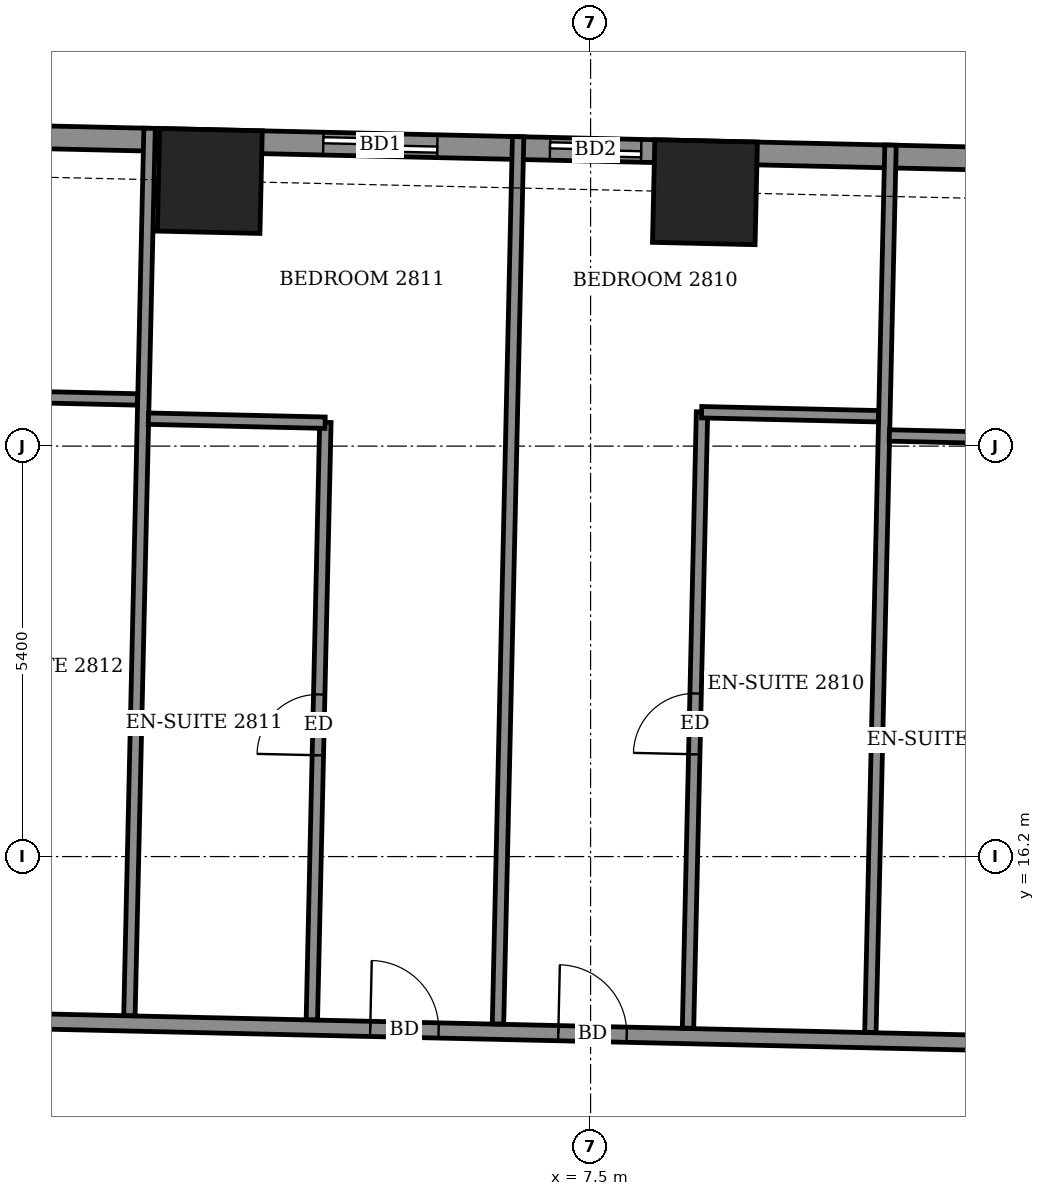
"""IFC4 building model, lengths in metres.
Left out: names, types, materials, properties, quantities, classifications, styles, units other than length and angle.
Written with IfcOpenShell. Run it as: python <this file> out.ifc"""

import sys

from ifc_helpers import new_model, si_unit, direction, frame, frame_2d, origin, origin_2d, place, context, subcontext, project, spatial, rectangle, extrude, element, fill, save


model = new_model("IFC4")
c1 = context("Model", 3, precision=1e-05, world=origin(), true_north=direction((0.0, 1.0)))
c2 = subcontext(c1, "Body", "Model", "MODEL_VIEW")
j1 = project(units=[si_unit("LENGTHUNIT", "METRE"), si_unit("PLANEANGLEUNIT", "RADIAN")], contexts=[c1])
p1 = place(None, origin())
s1 = spatial("IfcSite", under=j1, at=p1, CompositionType="ELEMENT")
p2 = place(p1, origin())
s2 = spatial("IfcBuilding", under=s1, at=p2, CompositionType="ELEMENT")
p3 = place(p2, frame((0.0, 0.0, 112.7)))
s3 = spatial("IfcBuildingStorey", under=s2, at=p3, CompositionType="ELEMENT", Elevation=112.7)
for number, where, z_axis, x_axis in (
    (1, (9.005, 24.94, -0.55), (0.0, 0.0, 1.0), (-1.0, 0.023, 0.0)),
    (2, (2.491, 25.088, -0.55), (0.0, 0.0, 1.0), (-1.0, 0.023, 0.0)),
):
    element("IfcColumn", number, at=place(p3, frame(where, z_axis=z_axis, x_axis=x_axis)), inside=s3, PredefinedType="COLUMN", context=c2, shape_type="SweptSolid", body=[
        extrude(rectangle(XDim=1.35, YDim=1.35, at=origin_2d()), origin(), (0.0, 0.0, 1.0), 3.6),
    ])
p4 = place(p3, frame((21.894, 25.173, 0.0), z_axis=(0.0, 0.0, 1.0), x_axis=(-0.999742661083, 0.022685052594, 0.0)))
e3 = element("IfcWall", 3, at=p4, inside=s3, PredefinedType="SOLIDWALL", context=c2, shape_type="SweptSolid", body=[
    extrude(rectangle(XDim=45.309, YDim=0.3, at=frame_2d((22.654, 0.0))), origin(), (0.0, 0.0, 1.0), 3.05),
])
p5 = place(p4, frame((2.495, 0.0, 0.0)))
e4 = element("IfcOpeningElement", 4, at=p5, cuts=e3, PredefinedType="OPENING", context=c2, shape_type="SweptSolid", body=[
    extrude(rectangle(XDim=1.5, YDim=2.4, at=frame_2d((0.75, 1.2))), frame((0.0, 0.16, 0.0), z_axis=(0.0, -1.0, 0.0), x_axis=(1.0, 0.0, 0.0)), (0.0, 0.0, 1.0), 0.32),
])
p6 = place(p4, frame((7.874, 0.0, 0.0)))
e5 = element("IfcOpeningElement", 5, at=p6, cuts=e3, PredefinedType="OPENING", context=c2, shape_type="SweptSolid", body=[
    extrude(rectangle(XDim=1.5, YDim=2.4, at=frame_2d((0.75, 1.2))), frame((0.0, 0.16, 0.0), z_axis=(0.0, -1.0, 0.0), x_axis=(1.0, 0.0, 0.0)), (0.0, 0.0, 1.0), 0.32),
])
p7 = place(p4, frame((13.732, 0.0, 0.0)))
e6 = element("IfcOpeningElement", 6, at=p7, cuts=e3, PredefinedType="OPENING", context=c2, shape_type="SweptSolid", body=[
    extrude(rectangle(XDim=1.2, YDim=2.4, at=frame_2d((0.6, 1.2))), frame((0.0, 0.16, 0.0), z_axis=(0.0, -1.0, 0.0), x_axis=(1.0, 0.0, 0.0)), (0.0, 0.0, 1.0), 0.32),
])
p8 = place(p4, frame((16.415, 0.0, 0.0)))
e7 = element("IfcOpeningElement", 7, at=p8, cuts=e3, PredefinedType="OPENING", context=c2, shape_type="SweptSolid", body=[
    extrude(rectangle(XDim=1.5, YDim=2.4, at=frame_2d((0.75, 1.2))), frame((0.0, 0.16, 0.0), z_axis=(0.0, -1.0, 0.0), x_axis=(1.0, 0.0, 0.0)), (0.0, 0.0, 1.0), 0.32),
])
p9 = place(p4, frame((21.908, 0.0, 0.0)))
e8 = element("IfcOpeningElement", 8, at=p9, cuts=e3, PredefinedType="OPENING", context=c2, shape_type="SweptSolid", body=[
    extrude(rectangle(XDim=1.5, YDim=2.4, at=frame_2d((0.75, 1.2))), frame((0.0, 0.16, 0.0), z_axis=(0.0, -1.0, 0.0), x_axis=(1.0, 0.0, 0.0)), (0.0, 0.0, 1.0), 0.32),
])
p10 = place(p4, frame((27.397, 0.0, 0.0)))
e9 = element("IfcOpeningElement", 9, at=p10, cuts=e3, PredefinedType="OPENING", context=c2, shape_type="SweptSolid", body=[
    extrude(rectangle(XDim=1.5, YDim=2.4, at=frame_2d((0.75, 1.2))), frame((0.0, 0.16, 0.0), z_axis=(0.0, -1.0, 0.0), x_axis=(1.0, 0.0, 0.0)), (0.0, 0.0, 1.0), 0.32),
])
p11 = place(p4, frame((30.38, 0.0, 0.0)))
e10 = element("IfcOpeningElement", 10, at=p11, cuts=e3, PredefinedType="OPENING", context=c2, shape_type="SweptSolid", body=[
    extrude(rectangle(XDim=1.2, YDim=2.4, at=frame_2d((0.6, 1.2))), frame((0.0, 0.16, 0.0), z_axis=(0.0, -1.0, 0.0), x_axis=(1.0, 0.0, 0.0)), (0.0, 0.0, 1.0), 0.32),
])
p12 = place(p4, frame((35.913, 0.0, 0.0)))
e11 = element("IfcOpeningElement", 11, at=p12, cuts=e3, PredefinedType="OPENING", context=c2, shape_type="SweptSolid", body=[
    extrude(rectangle(XDim=1.5, YDim=2.4, at=frame_2d((0.75, 1.2))), frame((0.0, 0.16, 0.0), z_axis=(0.0, -1.0, 0.0), x_axis=(1.0, 0.0, 0.0)), (0.0, 0.0, 1.0), 0.32),
])
p13 = place(p4, frame((40.818, 0.0, 0.9)))
e12 = element("IfcOpeningElement", 12, at=p13, cuts=e3, PredefinedType="OPENING", context=c2, shape_type="SweptSolid", body=[
    extrude(rectangle(XDim=2.4, YDim=1.5, at=frame_2d((1.2, 0.75))), frame((0.0, 0.16, 0.0), z_axis=(0.0, -1.0, 0.0), x_axis=(1.0, 0.0, 0.0)), (0.0, 0.0, 1.0), 0.32),
])
p14 = place(p3, frame((-26.341, 14.635, 0.0), z_axis=(0.0, 0.0, 1.0), x_axis=(0.999742553034, -0.02268981385, 0.0)))
e13 = element("IfcWall", 13, at=p14, inside=s3, PredefinedType="PARTITIONING", context=c2, shape_type="SweptSolid", body=[
    extrude(rectangle(XDim=50.733, YDim=0.2, at=frame_2d((25.366, 0.0))), origin(), (0.0, 0.0, 1.0), 3.05),
])
p15 = place(p14, frame((47.954, 0.0, 0.0)))
e14 = element("IfcOpeningElement", 14, at=p15, cuts=e13, PredefinedType="OPENING", context=c2, shape_type="SweptSolid", body=[
    extrude(rectangle(XDim=1.0, YDim=2.1, at=frame_2d((0.5, 1.05))), frame((0.0, 0.11, 0.0), z_axis=(0.0, -1.0, 0.0), x_axis=(1.0, 0.0, 0.0)), (0.0, 0.0, 1.0), 0.22),
])
p16 = place(p14, frame((43.125, 0.0, 0.0)))
e15 = element("IfcOpeningElement", 15, at=p16, cuts=e13, PredefinedType="OPENING", context=c2, shape_type="SweptSolid", body=[
    extrude(rectangle(XDim=0.9, YDim=2.1, at=frame_2d((0.45, 1.05))), frame((0.0, 0.11, 0.0), z_axis=(0.0, -1.0, 0.0), x_axis=(1.0, 0.0, 0.0)), (0.0, 0.0, 1.0), 0.22),
])
p17 = place(p14, frame((40.7, 0.0, 0.0)))
e16 = element("IfcOpeningElement", 16, at=p17, cuts=e13, PredefinedType="OPENING", context=c2, shape_type="SweptSolid", body=[
    extrude(rectangle(XDim=0.9, YDim=2.1, at=frame_2d((0.45, 1.05))), frame((0.0, 0.11, 0.0), z_axis=(0.0, -1.0, 0.0), x_axis=(1.0, 0.0, 0.0)), (0.0, 0.0, 1.0), 0.22),
])
p18 = place(p14, frame((33.425, 0.0, 0.0)))
e17 = element("IfcOpeningElement", 17, at=p18, cuts=e13, PredefinedType="OPENING", context=c2, shape_type="SweptSolid", body=[
    extrude(rectangle(XDim=0.9, YDim=2.1, at=frame_2d((0.45, 1.05))), frame((0.0, 0.11, 0.0), z_axis=(0.0, -1.0, 0.0), x_axis=(1.0, 0.0, 0.0)), (0.0, 0.0, 1.0), 0.22),
])
p19 = place(p14, frame((30.95, 0.0, 0.0)))
e18 = element("IfcOpeningElement", 18, at=p19, cuts=e13, PredefinedType="OPENING", context=c2, shape_type="SweptSolid", body=[
    extrude(rectangle(XDim=0.9, YDim=2.1, at=frame_2d((0.45, 1.05))), frame((0.0, 0.11, 0.0), z_axis=(0.0, -1.0, 0.0), x_axis=(1.0, 0.0, 0.0)), (0.0, 0.0, 1.0), 0.22),
])
p20 = place(p14, frame((23.675, 0.0, 0.0)))
e19 = element("IfcOpeningElement", 19, at=p20, cuts=e13, PredefinedType="OPENING", context=c2, shape_type="SweptSolid", body=[
    extrude(rectangle(XDim=0.9, YDim=2.1, at=frame_2d((0.45, 1.05))), frame((0.0, 0.11, 0.0), z_axis=(0.0, -1.0, 0.0), x_axis=(1.0, 0.0, 0.0)), (0.0, 0.0, 1.0), 0.22),
])
p21 = place(p14, frame((21.2, 0.0, 0.0)))
e20 = element("IfcOpeningElement", 20, at=p21, cuts=e13, PredefinedType="OPENING", context=c2, shape_type="SweptSolid", body=[
    extrude(rectangle(XDim=0.9, YDim=2.1, at=frame_2d((0.45, 1.05))), frame((0.0, 0.11, 0.0), z_axis=(0.0, -1.0, 0.0), x_axis=(1.0, 0.0, 0.0)), (0.0, 0.0, 1.0), 0.22),
])
p22 = place(p14, frame((13.95, 0.0, 0.0)))
e21 = element("IfcOpeningElement", 21, at=p22, cuts=e13, PredefinedType="OPENING", context=c2, shape_type="SweptSolid", body=[
    extrude(rectangle(XDim=0.9, YDim=2.1, at=frame_2d((0.45, 1.05))), frame((0.0, 0.11, 0.0), z_axis=(0.0, -1.0, 0.0), x_axis=(1.0, 0.0, 0.0)), (0.0, 0.0, 1.0), 0.22),
])
p23 = place(p14, frame((11.475, 0.0, 0.0)))
e22 = element("IfcOpeningElement", 22, at=p23, cuts=e13, PredefinedType="OPENING", context=c2, shape_type="SweptSolid", body=[
    extrude(rectangle(XDim=0.9, YDim=2.1, at=frame_2d((0.45, 1.05))), frame((0.0, 0.11, 0.0), z_axis=(0.0, -1.0, 0.0), x_axis=(1.0, 0.0, 0.0)), (0.0, 0.0, 1.0), 0.22),
])
p24 = place(p14, frame((1.4, 0.0, 0.0)))
e23 = element("IfcOpeningElement", 23, at=p24, cuts=e13, PredefinedType="OPENING", context=c2, shape_type="SweptSolid", body=[
    extrude(rectangle(XDim=1.0, YDim=2.1, at=frame_2d((0.5, 1.05))), frame((0.0, 0.11, 0.0), z_axis=(0.0, -1.0, 0.0), x_axis=(1.0, 0.0, 0.0)), (0.0, 0.0, 1.0), 0.22),
])
p25 = place(p14, frame((6.625, 0.0, 0.0)))
e24 = element("IfcOpeningElement", 24, at=p25, cuts=e13, PredefinedType="OPENING", context=c2, shape_type="SweptSolid", body=[
    extrude(rectangle(XDim=0.9, YDim=2.1, at=frame_2d((0.45, 1.05))), frame((0.0, 0.11, 0.0), z_axis=(0.0, -1.0, 0.0), x_axis=(1.0, 0.0, 0.0)), (0.0, 0.0, 1.0), 0.22),
])
p26 = place(p3, frame((1.433, 14.108, 0.0), z_axis=(0.0, 0.0, 1.0), x_axis=(0.022686732602, 0.99974262296, 0.0)))
e25 = element("IfcWall", 25, at=p26, inside=s3, PredefinedType="PARTITIONING", context=c2, shape_type="SweptSolid", body=[
    extrude(rectangle(XDim=11.676, YDim=0.15, at=frame_2d((5.838, 0.0))), origin(), (0.0, 0.0, 1.0), 2.55),
])
p27 = place(p3, frame((3.833, 14.054, 0.0), z_axis=(0.0, 0.0, 1.0), x_axis=(0.022643088621, 0.999743612402, 0.0)))
e26 = element("IfcWall", 26, at=p27, inside=s3, PredefinedType="PARTITIONING", context=c2, shape_type="SweptSolid", body=[
    extrude(rectangle(XDim=7.86, YDim=0.15, at=frame_2d((3.93, 0.0))), origin(), (0.0, 0.0, 1.0), 3.05),
])
p28 = place(p27, frame((3.48, 0.0, 0.0)))
e27 = element("IfcOpeningElement", 27, at=p28, cuts=e26, PredefinedType="OPENING", context=c2, shape_type="SweptSolid", body=[
    extrude(rectangle(XDim=0.8, YDim=2.1, at=frame_2d((0.4, 1.05))), frame((0.0, 0.085, 0.0), z_axis=(0.0, -1.0, 0.0), x_axis=(1.0, 0.0, 0.0)), (0.0, 0.0, 1.0), 0.17),
])
p29 = place(p3, frame((6.282, 13.998, 0.0), z_axis=(0.0, 0.0, 1.0), x_axis=(0.022708105947, 0.999742137716, 0.0)))
e28 = element("IfcWall", 28, at=p29, inside=s3, PredefinedType="PARTITIONING", context=c2, shape_type="SweptSolid", body=[
    extrude(rectangle(XDim=11.676, YDim=0.15, at=frame_2d((5.838, 0.0))), origin(), (0.0, 0.0, 1.0), 2.55),
])
p30 = place(p3, frame((8.782, 13.942, 0.0), z_axis=(0.0, 0.0, 1.0), x_axis=(0.022697472341, 0.99974237919, 0.0)))
e29 = element("IfcWall", 29, at=p30, inside=s3, PredefinedType="PARTITIONING", context=c2, shape_type="SweptSolid", body=[
    extrude(rectangle(XDim=8.11, YDim=0.15, at=frame_2d((4.055, 0.0))), origin(), (0.0, 0.0, 1.0), 3.05),
])
p31 = place(p30, frame((3.605, 0.0, 0.0)))
e30 = element("IfcOpeningElement", 30, at=p31, cuts=e29, PredefinedType="OPENING", context=c2, shape_type="SweptSolid", body=[
    extrude(rectangle(XDim=0.8, YDim=2.1, at=frame_2d((0.4, 1.05))), frame((0.0, 0.085, 0.0), z_axis=(0.0, -1.0, 0.0), x_axis=(1.0, 0.0, 0.0)), (0.0, 0.0, 1.0), 0.17),
])
p32 = place(p3, frame((11.181, 13.887, 0.0), z_axis=(0.0, 0.0, 1.0), x_axis=(0.022707631257, 0.999742148498, 0.0)))
e31 = element("IfcWall", 31, at=p32, inside=s3, PredefinedType="PARTITIONING", context=c2, shape_type="SweptSolid", body=[
    extrude(rectangle(XDim=11.676, YDim=0.15, at=frame_2d((5.838, 0.0))), origin(), (0.0, 0.0, 1.0), 2.55),
])
p33 = place(p3, frame((1.683, 21.961, 0.0), z_axis=(0.0, 0.0, 1.0), x_axis=(0.999740260747, -0.02279059109, 0.0)))
e32 = element("IfcWall", 32, at=p33, inside=s3, PredefinedType="PARTITIONING", context=c2, shape_type="SweptSolid", body=[
    extrude(rectangle(XDim=2.324, YDim=0.15, at=frame_2d((1.162, 0.0))), origin(), (0.0, 0.0, 1.0), 3.05),
])
p34 = place(p3, frame((11.43, 21.74, 0.0), z_axis=(0.0, 0.0, 1.0), x_axis=(0.999740478815, -0.022781023197, 0.0)))
e33 = element("IfcWall", 33, at=p34, inside=s3, PredefinedType="PARTITIONING", context=c2, shape_type="SweptSolid", body=[
    extrude(rectangle(XDim=2.325, YDim=0.15, at=frame_2d((1.163, 0.0))), origin(), (0.0, 0.0, 1.0), 3.05),
])
p35 = place(p3, frame((-0.786, 22.267, 0.0), z_axis=(0.0, 0.0, 1.0), x_axis=(0.999740260747, -0.02279059109, 0.0)))
e34 = element("IfcWall", 34, at=p35, inside=s3, PredefinedType="PARTITIONING", context=c2, shape_type="SweptSolid", body=[
    extrude(rectangle(XDim=2.324, YDim=0.15, at=frame_2d((1.162, 0.0))), origin(), (0.0, 0.0, 1.0), 3.05),
])
p36 = place(p3, frame((8.961, 22.046, 0.0), z_axis=(0.0, 0.0, 1.0), x_axis=(0.999740478815, -0.022781023197, 0.0)))
e35 = element("IfcWall", 35, at=p36, inside=s3, PredefinedType="PARTITIONING", context=c2, shape_type="SweptSolid", body=[
    extrude(rectangle(XDim=2.325, YDim=0.15, at=frame_2d((1.163, 0.0))), origin(), (0.0, 0.0, 1.0), 3.05),
])
p37 = place(p7, origin())
e36 = element("IfcDoor", 36, at=p37, inside=s3, OperationType="SLIDING_TO_LEFT", PredefinedType="DOOR", context=c2, shape_type="SweptSolid", body=[
    extrude(rectangle(XDim=1.2, YDim=2.4, at=frame_2d((0.6, 1.2))), frame((0.0, 0.025, 0.0), z_axis=(0.0, -1.0, 0.0), x_axis=(1.0, 0.0, 0.0)), (0.0, 0.0, 1.0), 0.05),
])
fill(e6, e36)
p38 = place(p8, origin())
e37 = element("IfcDoor", 37, at=p38, inside=s3, OperationType="SLIDING_TO_LEFT", PredefinedType="DOOR", context=c2, shape_type="SweptSolid", body=[
    extrude(rectangle(XDim=1.5, YDim=2.4, at=frame_2d((0.75, 1.2))), frame((0.0, 0.025, 0.0), z_axis=(0.0, -1.0, 0.0), x_axis=(1.0, 0.0, 0.0)), (0.0, 0.0, 1.0), 0.05),
])
fill(e7, e37)
p39 = place(p18, origin())
e38 = element("IfcDoor", 38, at=p39, inside=s3, OperationType="SINGLE_SWING_RIGHT", PredefinedType="DOOR", context=c2, shape_type="SweptSolid", body=[
    extrude(rectangle(XDim=0.9, YDim=2.1, at=frame_2d((0.45, 1.05))), frame((0.0, 0.025, 0.0), z_axis=(0.0, -1.0, 0.0), x_axis=(1.0, 0.0, 0.0)), (0.0, 0.0, 1.0), 0.05),
])
fill(e17, e38)
p40 = place(p31, origin())
e39 = element("IfcDoor", 39, at=p40, inside=s3, OperationType="SINGLE_SWING_RIGHT", PredefinedType="DOOR", context=c2, shape_type="SweptSolid", body=[
    extrude(rectangle(XDim=0.8, YDim=2.1, at=frame_2d((0.4, 1.05))), frame((0.0, 0.025, 0.0), z_axis=(0.0, -1.0, 0.0), x_axis=(1.0, 0.0, 0.0)), (0.0, 0.0, 1.0), 0.05),
])
fill(e30, e39)
p41 = place(p19, origin())
e40 = element("IfcDoor", 40, at=p41, inside=s3, OperationType="SINGLE_SWING_LEFT", PredefinedType="DOOR", context=c2, shape_type="SweptSolid", body=[
    extrude(rectangle(XDim=0.9, YDim=2.1, at=frame_2d((0.45, 1.05))), frame((0.0, 0.025, 0.0), z_axis=(0.0, -1.0, 0.0), x_axis=(1.0, 0.0, 0.0)), (0.0, 0.0, 1.0), 0.05),
])
fill(e18, e40)
p42 = place(p28, origin())
e41 = element("IfcDoor", 41, at=p42, inside=s3, OperationType="SINGLE_SWING_LEFT", PredefinedType="DOOR", context=c2, shape_type="SweptSolid", body=[
    extrude(rectangle(XDim=0.8, YDim=2.1, at=frame_2d((0.4, 1.05))), frame((0.0, 0.025, 0.0), z_axis=(0.0, -1.0, 0.0), x_axis=(1.0, 0.0, 0.0)), (0.0, 0.0, 1.0), 0.05),
])
fill(e27, e41)
save(model, sys.argv[1])
